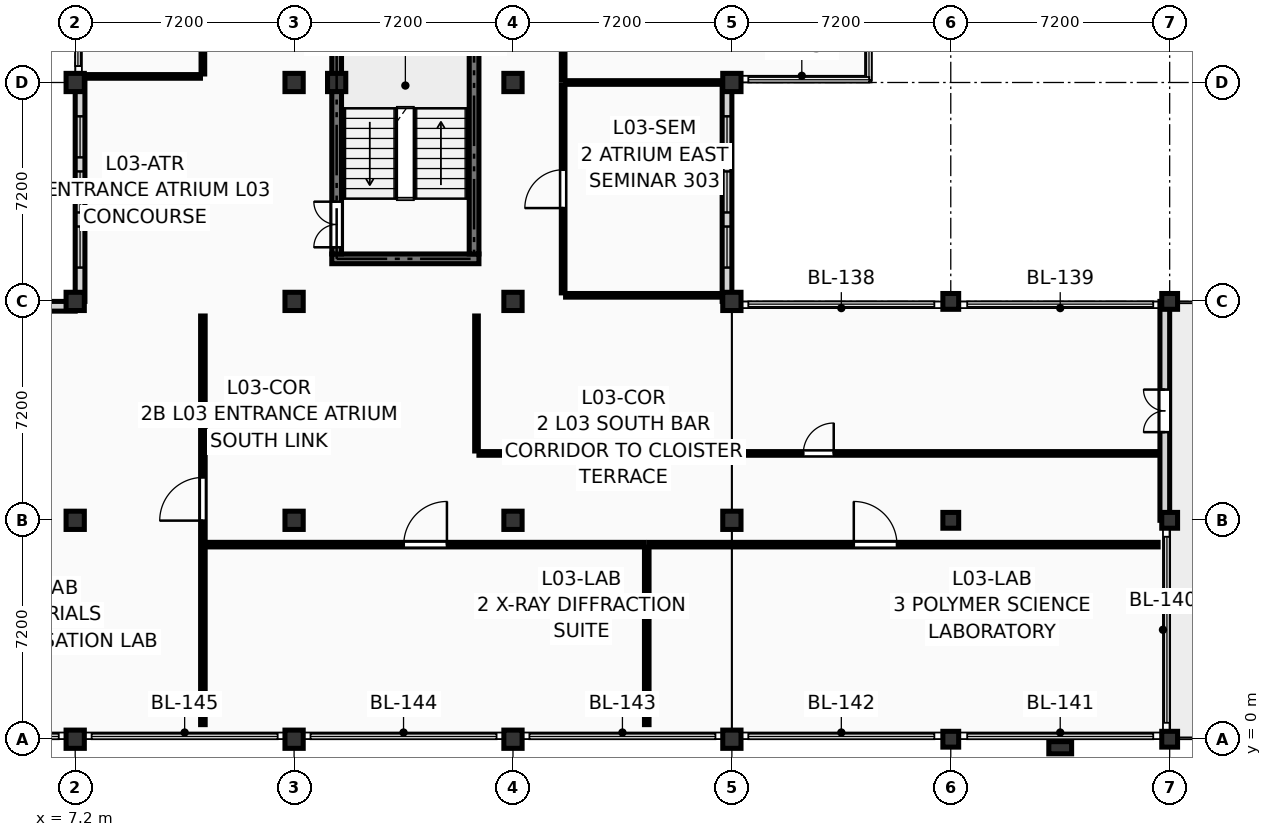
"""IFC4 building model, lengths in metres.
Left out: names, types, materials, properties, quantities, classifications, styles, units other than length and angle.
Written with IfcOpenShell. Run it as: python <this file> out.ifc"""

import sys

from ifc_helpers import new_model, si_unit, direction, frame, frame_2d, origin, origin_2d, place, context, subcontext, project, spatial, rectangle, extrude, element, fill, save


model = new_model("IFC4")
c1 = context("Model", 3, precision=1e-05, world=origin(), true_north=direction((0.0, 1.0)))
c2 = subcontext(c1, "Body", "Model", "MODEL_VIEW")
j1 = project(units=[si_unit("LENGTHUNIT", "METRE"), si_unit("PLANEANGLEUNIT", "RADIAN")], contexts=[c1])
p1 = place(None, origin())
s1 = spatial("IfcSite", under=j1, at=p1, CompositionType="ELEMENT")
p2 = place(p1, origin())
s2 = spatial("IfcBuilding", under=s1, at=p2, CompositionType="ELEMENT")
p3 = place(p2, frame((0.0, 0.0, 12.15)))
s3 = spatial("IfcBuildingStorey", under=s2, at=p3, CompositionType="ELEMENT", Elevation=12.15)
for number, where, z_axis, x_axis in (
    (1, (7.2, 0.0, 0.0), (0.0, 0.0, 1.0), (1.0, 0.0, 0.0)),
    (2, (7.2, 7.2, 0.0), (0.0, 0.0, 1.0), (1.0, 0.0, 0.0)),
    (3, (7.2, 14.4, 0.0), (0.0, 0.0, 1.0), (1.0, 0.0, 0.0)),
    (4, (7.2, 21.6, 0.0), (0.0, 0.0, 1.0), (1.0, 0.0, 0.0)),
    (5, (14.4, 0.0, 0.0), (0.0, 0.0, 1.0), (1.0, 0.0, 0.0)),
    (6, (14.4, 7.2, 0.0), (0.0, 0.0, 1.0), (1.0, 0.0, 0.0)),
    (7, (14.4, 14.4, 0.0), (0.0, 0.0, 1.0), (1.0, 0.0, 0.0)),
    (8, (14.4, 21.6, 0.0), (0.0, 0.0, 1.0), (1.0, 0.0, 0.0)),
    (9, (15.8, 21.6, 0.0), (0.0, 0.0, 1.0), (1.0, 0.0, 0.0)),
    (10, (21.6, 0.0, 0.0), (0.0, 0.0, 1.0), (1.0, 0.0, 0.0)),
    (11, (21.6, 7.2, 0.0), (0.0, 0.0, 1.0), (1.0, 0.0, 0.0)),
    (12, (21.6, 14.4, 0.0), (0.0, 0.0, 1.0), (1.0, 0.0, 0.0)),
    (13, (21.6, 21.6, 0.0), (0.0, 0.0, 1.0), (1.0, 0.0, 0.0)),
    (14, (28.8, 0.0, 0.0), (0.0, 0.0, 1.0), (1.0, 0.0, 0.0)),
    (15, (28.8, 7.2, 0.0), (0.0, 0.0, 1.0), (1.0, 0.0, 0.0)),
    (16, (28.8, 14.4, 0.0), (0.0, 0.0, 1.0), (1.0, 0.0, 0.0)),
    (17, (28.8, 21.6, 0.0), (0.0, 0.0, 1.0), (1.0, 0.0, 0.0)),
):
    element("IfcColumn", number, at=place(p3, frame(where, z_axis=z_axis, x_axis=x_axis)), inside=s3, PredefinedType="COLUMN", context=c2, shape_type="SweptSolid", body=[
        extrude(rectangle(XDim=0.6, YDim=0.6, at=origin_2d()), origin(), (0.0, 0.0, 1.0), 3.6),
    ])
for number, where, z_axis, x_axis in (
    (18, (36.0, 0.0, 0.0), (0.0, 0.0, 1.0), (1.0, 0.0, 0.0)),
    (19, (36.0, 7.2, 0.0), (0.0, 0.0, 1.0), (1.0, 0.0, 0.0)),
    (20, (36.0, 14.4, 0.0), (0.0, 0.0, 1.0), (1.0, 0.0, 0.0)),
    (21, (43.2, 0.0, 0.0), (0.0, 0.0, 1.0), (1.0, 0.0, 0.0)),
    (22, (43.2, 7.2, 0.0), (0.0, 0.0, 1.0), (1.0, 0.0, 0.0)),
    (23, (43.2, 14.4, 0.0), (0.0, 0.0, 1.0), (1.0, 0.0, 0.0)),
):
    element("IfcColumn", number, at=place(p3, frame(where, z_axis=z_axis, x_axis=x_axis)), inside=s3, PredefinedType="COLUMN", context=c2, shape_type="SweptSolid", body=[
        extrude(rectangle(XDim=0.52, YDim=0.52, at=origin_2d()), origin(), (0.0, 0.0, 1.0), 3.6),
    ])
p4 = place(p3, frame((39.6, -0.28, 0.0), z_axis=(0.0, 0.0, 1.0), x_axis=(0.0, 1.0, 0.0)))
e24 = element("IfcColumn", 24, at=p4, inside=s3, PredefinedType="PILASTER", context=c2, shape_type="SweptSolid", body=[
    extrude(rectangle(XDim=0.4, YDim=0.75, at=origin_2d()), origin(), (0.0, 0.0, 1.0), 3.6),
])
p5 = place(p3, frame((7.36, 14.4, 0.0), z_axis=(0.0, 0.0, 1.0), x_axis=(0.0, 1.0, 0.0)))
e25 = element("IfcWall", 25, at=p5, inside=s3, PredefinedType="SOLIDWALL", context=c2, shape_type="SweptSolid", body=[
    extrude(rectangle(XDim=7.2, YDim=0.32, at=frame_2d((3.6, 0.0))), origin(), (0.0, 0.0, 1.0), 2.84),
])
p6 = place(p5, frame((1.113, 0.0, 0.18)))
e26 = element("IfcOpeningElement", 26, at=p6, cuts=e25, PredefinedType="OPENING", context=c2, shape_type="SweptSolid", body=[
    extrude(rectangle(XDim=1.35, YDim=2.45, at=frame_2d((0.675, 1.225))), frame((0.0, 0.172, 0.0), z_axis=(0.0, -1.0, 0.0), x_axis=(1.0, 0.0, 0.0)), (0.0, 0.0, 1.0), 0.344),
])
p7 = place(p5, frame((2.925, 0.0, 0.18)))
e27 = element("IfcOpeningElement", 27, at=p7, cuts=e25, PredefinedType="OPENING", context=c2, shape_type="SweptSolid", body=[
    extrude(rectangle(XDim=1.35, YDim=2.45, at=frame_2d((0.675, 1.225))), frame((0.0, 0.172, 0.0), z_axis=(0.0, -1.0, 0.0), x_axis=(1.0, 0.0, 0.0)), (0.0, 0.0, 1.0), 0.344),
])
p8 = place(p5, frame((4.738, 0.0, 0.18)))
e28 = element("IfcOpeningElement", 28, at=p8, cuts=e25, PredefinedType="OPENING", context=c2, shape_type="SweptSolid", body=[
    extrude(rectangle(XDim=1.35, YDim=2.45, at=frame_2d((0.675, 1.225))), frame((0.0, 0.172, 0.0), z_axis=(0.0, -1.0, 0.0), x_axis=(1.0, 0.0, 0.0)), (0.0, 0.0, 1.0), 0.344),
])
p9 = place(p3, frame((28.64, 14.4, 0.0), z_axis=(0.0, 0.0, 1.0), x_axis=(0.0, 1.0, 0.0)))
e29 = element("IfcWall", 29, at=p9, inside=s3, PredefinedType="SOLIDWALL", context=c2, shape_type="SweptSolid", body=[
    extrude(rectangle(XDim=7.2, YDim=0.32, at=frame_2d((3.6, 0.0))), origin(), (0.0, 0.0, 1.0), 2.84),
])
p10 = place(p9, frame((1.113, 0.0, 0.18)))
e30 = element("IfcOpeningElement", 30, at=p10, cuts=e29, PredefinedType="OPENING", context=c2, shape_type="SweptSolid", body=[
    extrude(rectangle(XDim=1.35, YDim=2.45, at=frame_2d((0.675, 1.225))), frame((0.0, 0.172, 0.0), z_axis=(0.0, -1.0, 0.0), x_axis=(1.0, 0.0, 0.0)), (0.0, 0.0, 1.0), 0.344),
])
p11 = place(p9, frame((2.925, 0.0, 0.18)))
e31 = element("IfcOpeningElement", 31, at=p11, cuts=e29, PredefinedType="OPENING", context=c2, shape_type="SweptSolid", body=[
    extrude(rectangle(XDim=1.35, YDim=2.45, at=frame_2d((0.675, 1.225))), frame((0.0, 0.172, 0.0), z_axis=(0.0, -1.0, 0.0), x_axis=(1.0, 0.0, 0.0)), (0.0, 0.0, 1.0), 0.344),
])
p12 = place(p9, frame((4.738, 0.0, 0.18)))
e32 = element("IfcOpeningElement", 32, at=p12, cuts=e29, PredefinedType="OPENING", context=c2, shape_type="SweptSolid", body=[
    extrude(rectangle(XDim=1.35, YDim=2.45, at=frame_2d((0.675, 1.225))), frame((0.0, 0.172, 0.0), z_axis=(0.0, -1.0, 0.0), x_axis=(1.0, 0.0, 0.0)), (0.0, 0.0, 1.0), 0.344),
])
p13 = place(p3, frame((43.04, 7.2, 0.0), z_axis=(0.0, 0.0, 1.0), x_axis=(0.0, 1.0, 0.0)))
e33 = element("IfcWall", 33, at=p13, inside=s3, PredefinedType="SOLIDWALL", context=c2, shape_type="SweptSolid", body=[
    extrude(rectangle(XDim=7.2, YDim=0.32, at=frame_2d((3.6, 0.0))), origin(), (0.0, 0.0, 1.0), 2.84),
])
p14 = place(p13, frame((2.9, 0.0, 0.0)))
e34 = element("IfcOpeningElement", 34, at=p14, cuts=e33, PredefinedType="OPENING", context=c2, shape_type="SweptSolid", body=[
    extrude(rectangle(XDim=1.4, YDim=2.2, at=frame_2d((0.7, 1.1))), frame((0.0, 0.172, 0.0), z_axis=(0.0, -1.0, 0.0), x_axis=(1.0, 0.0, 0.0)), (0.0, 0.0, 1.0), 0.344),
])
p15 = place(p3, frame((0.0, 14.24, 0.0), z_axis=(0.0, 0.0, 1.0), x_axis=(1.0, 0.0, 0.0)))
e35 = element("IfcWall", 35, at=p15, inside=s3, PredefinedType="SOLIDWALL", context=c2, shape_type="SweptSolid", body=[
    extrude(rectangle(XDim=7.2, YDim=0.32, at=frame_2d((3.6, 0.0))), origin(), (0.0, 0.0, 1.0), 2.84),
])
p16 = place(p15, frame((1.113, 0.0, 0.18)))
e36 = element("IfcOpeningElement", 36, at=p16, cuts=e35, PredefinedType="OPENING", context=c2, shape_type="SweptSolid", body=[
    extrude(rectangle(XDim=1.35, YDim=2.45, at=frame_2d((0.675, 1.225))), frame((0.0, 0.172, 0.0), z_axis=(0.0, -1.0, 0.0), x_axis=(1.0, 0.0, 0.0)), (0.0, 0.0, 1.0), 0.344),
])
p17 = place(p15, frame((2.925, 0.0, 0.18)))
e37 = element("IfcOpeningElement", 37, at=p17, cuts=e35, PredefinedType="OPENING", context=c2, shape_type="SweptSolid", body=[
    extrude(rectangle(XDim=1.35, YDim=2.45, at=frame_2d((0.675, 1.225))), frame((0.0, 0.172, 0.0), z_axis=(0.0, -1.0, 0.0), x_axis=(1.0, 0.0, 0.0)), (0.0, 0.0, 1.0), 0.344),
])
p18 = place(p15, frame((4.738, 0.0, 0.18)))
e38 = element("IfcOpeningElement", 38, at=p18, cuts=e35, PredefinedType="OPENING", context=c2, shape_type="SweptSolid", body=[
    extrude(rectangle(XDim=1.35, YDim=2.45, at=frame_2d((0.675, 1.225))), frame((0.0, 0.172, 0.0), z_axis=(0.0, -1.0, 0.0), x_axis=(1.0, 0.0, 0.0)), (0.0, 0.0, 1.0), 0.344),
])
p19 = place(p3, frame((15.64, 15.8, 0.0), z_axis=(0.0, 0.0, 1.0), x_axis=(1.0, 0.0, 0.0)))
e39 = element("IfcWall", 39, at=p19, inside=s3, PredefinedType="SHEAR", context=c2, shape_type="SweptSolid", body=[
    extrude(rectangle(XDim=4.84, YDim=0.32, at=frame_2d((2.42, 0.0))), origin(), (0.0, 0.0, 1.0), 3.39),
])
p20 = place(p3, frame((15.8, 15.96, 0.0), z_axis=(0.0, 0.0, 1.0), x_axis=(0.0, 1.0, 0.0)))
e40 = element("IfcWall", 40, at=p20, inside=s3, PredefinedType="SHEAR", context=c2, shape_type="SweptSolid", body=[
    extrude(rectangle(XDim=7.68, YDim=0.32, at=frame_2d((3.84, 0.0))), origin(), (0.0, 0.0, 1.0), 3.39),
])
p21 = place(p20, frame((0.22, 0.0, 0.0)))
e41 = element("IfcOpeningElement", 41, at=p21, cuts=e40, PredefinedType="OPENING", context=c2, shape_type="SweptSolid", body=[
    extrude(rectangle(XDim=1.5, YDim=2.2, at=frame_2d((0.75, 1.1))), frame((0.0, 0.172, 0.0), z_axis=(0.0, -1.0, 0.0), x_axis=(1.0, 0.0, 0.0)), (0.0, 0.0, 1.0), 0.344),
])
p22 = place(p3, frame((20.32, 15.96, 0.0), z_axis=(0.0, 0.0, 1.0), x_axis=(0.0, 1.0, 0.0)))
e42 = element("IfcWall", 42, at=p22, inside=s3, PredefinedType="SHEAR", context=c2, shape_type="SweptSolid", body=[
    extrude(rectangle(XDim=7.68, YDim=0.32, at=frame_2d((3.84, 0.0))), origin(), (0.0, 0.0, 1.0), 3.39),
])
p23 = place(p3, frame((11.4, 0.48, 0.0), z_axis=(0.0, 0.0, 1.0), x_axis=(0.0, 1.0, 0.0)))
e43 = element("IfcWall", 43, at=p23, inside=s3, PredefinedType="PARTITIONING", context=c2, shape_type="SweptSolid", body=[
    extrude(rectangle(XDim=13.44, YDim=0.15, at=frame_2d((6.72, 0.0))), origin(), (0.0, 0.0, 1.0), 3.375),
])
p24 = place(p23, frame((6.71, 0.0, 0.0)))
e44 = element("IfcOpeningElement", 44, at=p24, cuts=e43, PredefinedType="OPENING", context=c2, shape_type="SweptSolid", body=[
    extrude(rectangle(XDim=1.42, YDim=2.22, at=frame_2d((0.71, 1.11))), frame((0.0, 0.087, 0.0), z_axis=(0.0, -1.0, 0.0), x_axis=(1.0, 0.0, 0.0)), (0.0, 0.0, 1.0), 0.174),
])
p25 = place(p3, frame((26.0, 0.48, 0.0), z_axis=(0.0, 0.0, 1.0), x_axis=(0.0, 1.0, 0.0)))
e45 = element("IfcWall", 45, at=p25, inside=s3, PredefinedType="PARTITIONING", context=c2, shape_type="SweptSolid", body=[
    extrude(rectangle(XDim=5.84, YDim=0.15, at=frame_2d((2.92, 0.0))), origin(), (0.0, 0.0, 1.0), 3.375),
])
p26 = place(p3, frame((11.515, 6.4, 0.0), z_axis=(0.0, 0.0, 1.0), x_axis=(1.0, 0.0, 0.0)))
e46 = element("IfcWall", 46, at=p26, inside=s3, PredefinedType="PARTITIONING", context=c2, shape_type="SweptSolid", body=[
    extrude(rectangle(XDim=14.405, YDim=0.15, at=frame_2d((7.203, 0.0))), origin(), (0.0, 0.0, 1.0), 3.375),
])
p27 = place(p26, frame((6.492, 0.0, 0.0)))
e47 = element("IfcOpeningElement", 47, at=p27, cuts=e46, PredefinedType="OPENING", context=c2, shape_type="SweptSolid", body=[
    extrude(rectangle(XDim=1.42, YDim=2.22, at=frame_2d((0.71, 1.11))), frame((0.0, 0.087, 0.0), z_axis=(0.0, -1.0, 0.0), x_axis=(1.0, 0.0, 0.0)), (0.0, 0.0, 1.0), 0.174),
])
p28 = place(p3, frame((26.08, 6.4, 0.0), z_axis=(0.0, 0.0, 1.0), x_axis=(1.0, 0.0, 0.0)))
e48 = element("IfcWall", 48, at=p28, inside=s3, PredefinedType="PARTITIONING", context=c2, shape_type="SweptSolid", body=[
    extrude(rectangle(XDim=16.74, YDim=0.15, at=frame_2d((8.37, 0.0))), origin(), (0.0, 0.0, 1.0), 3.375),
])
p29 = place(p28, frame((6.73, 0.0, 0.0)))
e49 = element("IfcOpeningElement", 49, at=p29, cuts=e48, PredefinedType="OPENING", context=c2, shape_type="SweptSolid", body=[
    extrude(rectangle(XDim=1.42, YDim=2.22, at=frame_2d((0.71, 1.11))), frame((0.0, 0.087, 0.0), z_axis=(0.0, -1.0, 0.0), x_axis=(1.0, 0.0, 0.0)), (0.0, 0.0, 1.0), 0.174),
])
p30 = place(p3, frame((20.4, 9.48, 0.0), z_axis=(0.0, 0.0, 1.0), x_axis=(0.0, 1.0, 0.0)))
e50 = element("IfcWall", 50, at=p30, inside=s3, PredefinedType="PARTITIONING", context=c2, shape_type="SweptSolid", body=[
    extrude(rectangle(XDim=4.44, YDim=0.12, at=frame_2d((2.22, 0.0))), origin(), (0.0, 0.0, 1.0), 3.375),
])
p31 = place(p3, frame((20.48, 9.4, 0.0), z_axis=(0.0, 0.0, 1.0), x_axis=(1.0, 0.0, 0.0)))
e51 = element("IfcWall", 51, at=p31, inside=s3, PredefinedType="PARTITIONING", context=c2, shape_type="SweptSolid", body=[
    extrude(rectangle(XDim=22.34, YDim=0.12, at=frame_2d((11.17, 0.0))), origin(), (0.0, 0.0, 1.0), 3.375),
])
p32 = place(p31, frame((10.67, 0.0, 0.0)))
e52 = element("IfcOpeningElement", 52, at=p32, cuts=e51, PredefinedType="OPENING", context=c2, shape_type="SweptSolid", body=[
    extrude(rectangle(XDim=1.0, YDim=2.15, at=frame_2d((0.5, 1.075))), frame((0.0, 0.072, 0.0), z_axis=(0.0, -1.0, 0.0), x_axis=(1.0, 0.0, 0.0)), (0.0, 0.0, 1.0), 0.144),
])
p33 = place(p3, frame((7.58, 21.8, 0.0), z_axis=(0.0, 0.0, 1.0), x_axis=(1.0, 0.0, 0.0)))
e53 = element("IfcWall", 53, at=p33, inside=s3, PredefinedType="PARTITIONING", context=c2, shape_type="SweptSolid", body=[
    extrude(rectangle(XDim=3.74, YDim=0.12, at=frame_2d((1.87, 0.0))), origin(), (0.0, 0.0, 1.0), 2.691),
])
p34 = place(p3, frame((11.4, 21.88, 0.0), z_axis=(0.0, 0.0, 1.0), x_axis=(0.0, 1.0, 0.0)))
e54 = element("IfcWall", 54, at=p34, inside=s3, PredefinedType="PARTITIONING", context=c2, shape_type="SweptSolid", body=[
    extrude(rectangle(XDim=16.84, YDim=0.12, at=frame_2d((8.42, 0.0))), origin(), (0.0, 0.0, 1.0), 3.375),
])
p35 = place(p34, frame((7.79, 0.0, 0.0)))
e55 = element("IfcOpeningElement", 55, at=p35, cuts=e54, PredefinedType="OPENING", context=c2, shape_type="SweptSolid", body=[
    extrude(rectangle(XDim=1.26, YDim=2.18, at=frame_2d((0.63, 1.09))), frame((0.0, 0.072, 0.0), z_axis=(0.0, -1.0, 0.0), x_axis=(1.0, 0.0, 0.0)), (0.0, 0.0, 1.0), 0.144),
])
p36 = place(p3, frame((23.25, 14.68, 0.0), z_axis=(0.0, 0.0, 1.0), x_axis=(0.0, 1.0, 0.0)))
e56 = element("IfcWall", 56, at=p36, inside=s3, PredefinedType="PARTITIONING", context=c2, shape_type="SweptSolid", body=[
    extrude(rectangle(XDim=6.84, YDim=0.12, at=frame_2d((3.42, 0.0))), origin(), (0.0, 0.0, 1.0), 3.375),
])
p37 = place(p36, frame((2.79, 0.0, 0.0)))
e57 = element("IfcOpeningElement", 57, at=p37, cuts=e56, PredefinedType="OPENING", context=c2, shape_type="SweptSolid", body=[
    extrude(rectangle(XDim=1.26, YDim=2.18, at=frame_2d((0.63, 1.09))), frame((0.0, 0.072, 0.0), z_axis=(0.0, -1.0, 0.0), x_axis=(1.0, 0.0, 0.0)), (0.0, 0.0, 1.0), 0.144),
])
p38 = place(p3, frame((23.33, 14.6, 0.0), z_axis=(0.0, 0.0, 1.0), x_axis=(1.0, 0.0, 0.0)))
e58 = element("IfcWall", 58, at=p38, inside=s3, PredefinedType="PARTITIONING", context=c2, shape_type="SweptSolid", body=[
    extrude(rectangle(XDim=5.09, YDim=0.12, at=frame_2d((2.545, 0.0))), origin(), (0.0, 0.0, 1.0), 2.595),
])
p39 = place(p3, frame((23.33, 21.6, 0.0), z_axis=(0.0, 0.0, 1.0), x_axis=(1.0, 0.0, 0.0)))
e59 = element("IfcWall", 59, at=p39, inside=s3, PredefinedType="PARTITIONING", context=c2, shape_type="SweptSolid", body=[
    extrude(rectangle(XDim=5.09, YDim=0.12, at=frame_2d((2.545, 0.0))), origin(), (0.0, 0.0, 1.0), 2.691),
])
p40 = place(p3, frame((23.25, 21.68, 0.0), z_axis=(0.0, 0.0, 1.0), x_axis=(0.0, 1.0, 0.0)))
e60 = element("IfcWall", 60, at=p40, inside=s3, PredefinedType="PARTITIONING", context=c2, shape_type="SweptSolid", body=[
    extrude(rectangle(XDim=12.84, YDim=0.12, at=frame_2d((6.42, 0.0))), origin(), (0.0, 0.0, 1.0), 3.375),
])
p41 = place(p40, frame((4.495, 0.0, 0.0)))
e61 = element("IfcOpeningElement", 61, at=p41, cuts=e60, PredefinedType="OPENING", context=c2, shape_type="SweptSolid", body=[
    extrude(rectangle(XDim=1.0, YDim=2.15, at=frame_2d((0.5, 1.075))), frame((0.0, 0.072, 0.0), z_axis=(0.0, -1.0, 0.0), x_axis=(1.0, 0.0, 0.0)), (0.0, 0.0, 1.0), 0.144),
])
p42 = place(p6, origin())
e62 = element("IfcWindow", 62, at=p42, inside=s3, PartitioningType="SINGLE_PANEL", PredefinedType="WINDOW", context=c2, shape_type="SweptSolid", body=[
    extrude(rectangle(XDim=1.35, YDim=2.45, at=frame_2d((0.675, 1.225))), frame((0.0, 0.03, 0.0), z_axis=(0.0, -1.0, 0.0), x_axis=(1.0, 0.0, 0.0)), (0.0, 0.0, 1.0), 0.06),
])
fill(e26, e62)
p43 = place(p7, origin())
e63 = element("IfcWindow", 63, at=p43, inside=s3, PartitioningType="SINGLE_PANEL", PredefinedType="WINDOW", context=c2, shape_type="SweptSolid", body=[
    extrude(rectangle(XDim=1.35, YDim=2.45, at=frame_2d((0.675, 1.225))), frame((0.0, 0.03, 0.0), z_axis=(0.0, -1.0, 0.0), x_axis=(1.0, 0.0, 0.0)), (0.0, 0.0, 1.0), 0.06),
])
fill(e27, e63)
p44 = place(p8, origin())
e64 = element("IfcWindow", 64, at=p44, inside=s3, PartitioningType="SINGLE_PANEL", PredefinedType="WINDOW", context=c2, shape_type="SweptSolid", body=[
    extrude(rectangle(XDim=1.35, YDim=2.45, at=frame_2d((0.675, 1.225))), frame((0.0, 0.03, 0.0), z_axis=(0.0, -1.0, 0.0), x_axis=(1.0, 0.0, 0.0)), (0.0, 0.0, 1.0), 0.06),
])
fill(e28, e64)
p45 = place(p10, origin())
e65 = element("IfcWindow", 65, at=p45, inside=s3, PartitioningType="SINGLE_PANEL", PredefinedType="WINDOW", context=c2, shape_type="SweptSolid", body=[
    extrude(rectangle(XDim=1.35, YDim=2.45, at=frame_2d((0.675, 1.225))), frame((0.0, 0.03, 0.0), z_axis=(0.0, -1.0, 0.0), x_axis=(1.0, 0.0, 0.0)), (0.0, 0.0, 1.0), 0.06),
])
fill(e30, e65)
p46 = place(p11, origin())
e66 = element("IfcWindow", 66, at=p46, inside=s3, PartitioningType="SINGLE_PANEL", PredefinedType="WINDOW", context=c2, shape_type="SweptSolid", body=[
    extrude(rectangle(XDim=1.35, YDim=2.45, at=frame_2d((0.675, 1.225))), frame((0.0, 0.03, 0.0), z_axis=(0.0, -1.0, 0.0), x_axis=(1.0, 0.0, 0.0)), (0.0, 0.0, 1.0), 0.06),
])
fill(e31, e66)
p47 = place(p12, origin())
e67 = element("IfcWindow", 67, at=p47, inside=s3, PartitioningType="SINGLE_PANEL", PredefinedType="WINDOW", context=c2, shape_type="SweptSolid", body=[
    extrude(rectangle(XDim=1.35, YDim=2.45, at=frame_2d((0.675, 1.225))), frame((0.0, 0.03, 0.0), z_axis=(0.0, -1.0, 0.0), x_axis=(1.0, 0.0, 0.0)), (0.0, 0.0, 1.0), 0.06),
])
fill(e32, e67)
p48 = place(p14, origin())
e68 = element("IfcDoor", 68, at=p48, inside=s3, OperationType="DOUBLE_DOOR_SINGLE_SWING", PredefinedType="DOOR", context=c2, shape_type="SweptSolid", body=[
    extrude(rectangle(XDim=1.4, YDim=2.2, at=frame_2d((0.7, 1.1))), frame((0.0, 0.025, 0.0), z_axis=(0.0, -1.0, 0.0), x_axis=(1.0, 0.0, 0.0)), (0.0, 0.0, 1.0), 0.05),
])
fill(e34, e68)
p49 = place(p21, origin())
e69 = element("IfcDoor", 69, at=p49, inside=s3, OperationType="DOUBLE_DOOR_SINGLE_SWING", PredefinedType="DOOR", context=c2, shape_type="SweptSolid", body=[
    extrude(rectangle(XDim=1.5, YDim=2.2, at=frame_2d((0.75, 1.1))), frame((0.0, 0.025, 0.0), z_axis=(0.0, -1.0, 0.0), x_axis=(1.0, 0.0, 0.0)), (0.0, 0.0, 1.0), 0.05),
])
fill(e41, e69)
p50 = place(p24, origin())
e70 = element("IfcDoor", 70, at=p50, inside=s3, OperationType="SINGLE_SWING_LEFT", PredefinedType="DOOR", context=c2, shape_type="SweptSolid", body=[
    extrude(rectangle(XDim=1.42, YDim=2.22, at=frame_2d((0.71, 1.11))), frame((0.0, 0.025, 0.0), z_axis=(0.0, -1.0, 0.0), x_axis=(1.0, 0.0, 0.0)), (0.0, 0.0, 1.0), 0.05),
])
fill(e44, e70)
p51 = place(p27, origin())
e71 = element("IfcDoor", 71, at=p51, inside=s3, OperationType="SINGLE_SWING_RIGHT", PredefinedType="DOOR", context=c2, shape_type="SweptSolid", body=[
    extrude(rectangle(XDim=1.42, YDim=2.22, at=frame_2d((0.71, 1.11))), frame((0.0, 0.025, 0.0), z_axis=(0.0, -1.0, 0.0), x_axis=(1.0, 0.0, 0.0)), (0.0, 0.0, 1.0), 0.05),
])
fill(e47, e71)
p52 = place(p29, origin())
e72 = element("IfcDoor", 72, at=p52, inside=s3, OperationType="SINGLE_SWING_LEFT", PredefinedType="DOOR", context=c2, shape_type="SweptSolid", body=[
    extrude(rectangle(XDim=1.42, YDim=2.22, at=frame_2d((0.71, 1.11))), frame((0.0, 0.025, 0.0), z_axis=(0.0, -1.0, 0.0), x_axis=(1.0, 0.0, 0.0)), (0.0, 0.0, 1.0), 0.05),
])
fill(e49, e72)
p53 = place(p32, origin())
e73 = element("IfcDoor", 73, at=p53, inside=s3, OperationType="SINGLE_SWING_RIGHT", PredefinedType="DOOR", context=c2, shape_type="SweptSolid", body=[
    extrude(rectangle(XDim=1.0, YDim=2.15, at=frame_2d((0.5, 1.075))), frame((0.0, 0.025, 0.0), z_axis=(0.0, -1.0, 0.0), x_axis=(1.0, 0.0, 0.0)), (0.0, 0.0, 1.0), 0.05),
])
fill(e52, e73)
p54 = place(p37, origin())
e74 = element("IfcDoor", 74, at=p54, inside=s3, OperationType="SINGLE_SWING_LEFT", PredefinedType="DOOR", context=c2, shape_type="SweptSolid", body=[
    extrude(rectangle(XDim=1.26, YDim=2.18, at=frame_2d((0.63, 1.09))), frame((0.0, 0.025, 0.0), z_axis=(0.0, -1.0, 0.0), x_axis=(1.0, 0.0, 0.0)), (0.0, 0.0, 1.0), 0.05),
])
fill(e57, e74)
save(model, sys.argv[1])
